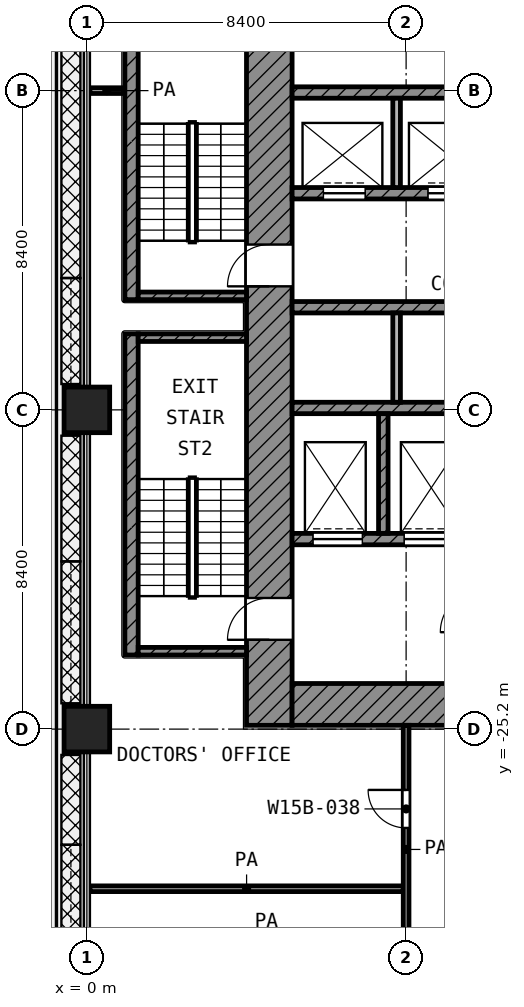
"""IFC4 building model, lengths in metres.
Left out: names, types, materials, properties, quantities, classifications, styles, units other than length and angle.
Written with IfcOpenShell. Run it as: python <this file> out.ifc"""

import sys

from ifc_helpers import new_model, si_unit, direction, frame, frame_2d, origin, origin_2d, place, context, subcontext, project, spatial, rectangle, extrude, element, fill, save


model = new_model("IFC4")
c1 = context("Model", 3, precision=1e-05, world=origin(), true_north=direction((0.0, 1.0)))
c2 = subcontext(c1, "Body", "Model", "MODEL_VIEW")
j1 = project(units=[si_unit("LENGTHUNIT", "METRE"), si_unit("PLANEANGLEUNIT", "RADIAN")], contexts=[c1])
p1 = place(None, origin())
s1 = spatial("IfcSite", under=j1, at=p1, CompositionType="ELEMENT")
p2 = place(p1, origin())
s2 = spatial("IfcBuilding", under=s1, at=p2, CompositionType="ELEMENT")
p3 = place(p2, frame((0.0, 0.0, 85.4)))
s3 = spatial("IfcBuildingStorey", under=s2, at=p3, CompositionType="ELEMENT", Elevation=85.4)
for number, where, z_axis, x_axis in (
    (1, (0.0, -16.8, 0.0), (0.0, 0.0, 1.0), (1.0, 0.0, 0.0)),
    (2, (0.0, -25.2, 0.0), (0.0, 0.0, 1.0), (1.0, 0.0, 0.0)),
):
    element("IfcColumn", number, at=place(p3, frame(where, z_axis=z_axis, x_axis=x_axis)), inside=s3, PredefinedType="COLUMN", context=c2, shape_type="SweptSolid", body=[
        extrude(rectangle(XDim=1.2, YDim=1.2, at=origin_2d()), origin(), (0.0, 0.0, 1.0), 4.2),
    ])
p4 = place(p3, frame((4.8, -25.1, 0.0), z_axis=(0.0, 0.0, 1.0), x_axis=(0.0, 1.0, 0.0)))
e3 = element("IfcWall", 3, at=p4, inside=s3, PredefinedType="SHEAR", context=c2, shape_type="SweptSolid", body=[
    extrude(rectangle(XDim=19.7, YDim=1.2, at=frame_2d((9.85, 0.0))), origin(), (0.0, 0.0, 1.0), 3.9),
])
p5 = place(p4, frame((11.55, 0.0, 0.0)))
e4 = element("IfcOpeningElement", 4, at=p5, cuts=e3, PredefinedType="OPENING", context=c2, shape_type="SweptSolid", body=[
    extrude(rectangle(XDim=1.1, YDim=2.1, at=frame_2d((0.55, 1.05))), frame((0.0, 0.61, 0.0), z_axis=(0.0, -1.0, 0.0), x_axis=(1.0, 0.0, 0.0)), (0.0, 0.0, 1.0), 1.22),
])
p6 = place(p4, frame((2.25, 0.0, 0.0)))
e5 = element("IfcOpeningElement", 5, at=p6, cuts=e3, PredefinedType="OPENING", context=c2, shape_type="SweptSolid", body=[
    extrude(rectangle(XDim=1.1, YDim=2.1, at=frame_2d((0.55, 1.05))), frame((0.0, 0.61, 0.0), z_axis=(0.0, -1.0, 0.0), x_axis=(1.0, 0.0, 0.0)), (0.0, 0.0, 1.0), 1.22),
])
p7 = place(p3, frame((5.4, -24.55, 0.0), z_axis=(0.0, 0.0, 1.0), x_axis=(1.0, 0.0, 0.0)))
e6 = element("IfcWall", 6, at=p7, inside=s3, PredefinedType="SHEAR", context=c2, shape_type="SweptSolid", body=[
    extrude(rectangle(XDim=18.6, YDim=1.1, at=frame_2d((9.3, 0.0))), origin(), (0.0, 0.0, 1.0), 3.9),
])
p8 = place(p7, frame((6.3, 0.0, 0.0)))
e7 = element("IfcOpeningElement", 7, at=p8, cuts=e6, PredefinedType="OPENING", context=c2, shape_type="SweptSolid", body=[
    extrude(rectangle(XDim=1.8, YDim=2.1, at=frame_2d((0.9, 1.05))), frame((0.0, 0.56, 0.0), z_axis=(0.0, -1.0, 0.0), x_axis=(1.0, 0.0, 0.0)), (0.0, 0.0, 1.0), 1.12),
])
p9 = place(p3, frame((5.4, -8.45, 0.0), z_axis=(0.0, 0.0, 1.0), x_axis=(1.0, 0.0, 0.0)))
e8 = element("IfcWall", 8, at=p9, inside=s3, PredefinedType="SHEAR", context=c2, shape_type="SweptSolid", body=[
    extrude(rectangle(XDim=16.65, YDim=0.3, at=frame_2d((8.325, 0.0))), origin(), (0.0, 0.0, 1.0), 3.9),
])
p10 = place(p3, frame((5.4, -11.1, 0.0), z_axis=(0.0, 0.0, 1.0), x_axis=(1.0, 0.0, 0.0)))
e9 = element("IfcWall", 9, at=p10, inside=s3, PredefinedType="SHEAR", context=c2, shape_type="SweptSolid", body=[
    extrude(rectangle(XDim=16.65, YDim=0.3, at=frame_2d((8.325, 0.0))), origin(), (0.0, 0.0, 1.0), 3.9),
])
p11 = place(p10, frame((0.825, 0.0, 0.0)))
e10 = element("IfcOpeningElement", 10, at=p11, cuts=e9, PredefinedType="OPENING", context=c2, shape_type="SweptSolid", body=[
    extrude(rectangle(XDim=1.1, YDim=2.1, at=frame_2d((0.55, 1.05))), frame((0.0, 0.16, 0.0), z_axis=(0.0, -1.0, 0.0), x_axis=(1.0, 0.0, 0.0)), (0.0, 0.0, 1.0), 0.32),
])
p12 = place(p10, frame((3.575, 0.0, 0.0)))
e11 = element("IfcOpeningElement", 11, at=p12, cuts=e9, PredefinedType="OPENING", context=c2, shape_type="SweptSolid", body=[
    extrude(rectangle(XDim=1.1, YDim=2.1, at=frame_2d((0.55, 1.05))), frame((0.0, 0.16, 0.0), z_axis=(0.0, -1.0, 0.0), x_axis=(1.0, 0.0, 0.0)), (0.0, 0.0, 1.0), 0.32),
])
p13 = place(p10, frame((6.325, 0.0, 0.0)))
e12 = element("IfcOpeningElement", 12, at=p13, cuts=e9, PredefinedType="OPENING", context=c2, shape_type="SweptSolid", body=[
    extrude(rectangle(XDim=1.1, YDim=2.1, at=frame_2d((0.55, 1.05))), frame((0.0, 0.16, 0.0), z_axis=(0.0, -1.0, 0.0), x_axis=(1.0, 0.0, 0.0)), (0.0, 0.0, 1.0), 0.32),
])
p14 = place(p10, frame((9.075, 0.0, 0.0)))
e13 = element("IfcOpeningElement", 13, at=p14, cuts=e9, PredefinedType="OPENING", context=c2, shape_type="SweptSolid", body=[
    extrude(rectangle(XDim=1.1, YDim=2.1, at=frame_2d((0.55, 1.05))), frame((0.0, 0.16, 0.0), z_axis=(0.0, -1.0, 0.0), x_axis=(1.0, 0.0, 0.0)), (0.0, 0.0, 1.0), 0.32),
])
for number, where, z_axis, x_axis in (
    (14, (5.4, -14.1, 0.0), (0.0, 0.0, 1.0), (1.0, 0.0, 0.0)),
    (15, (5.4, -16.75, 0.0), (0.0, 0.0, 1.0), (1.0, 0.0, 0.0)),
):
    element("IfcWall", number, at=place(p3, frame(where, z_axis=z_axis, x_axis=x_axis)), inside=s3, PredefinedType="SHEAR", context=c2, shape_type="SweptSolid", body=[
        extrude(rectangle(XDim=16.65, YDim=0.3, at=frame_2d((8.325, 0.0))), origin(), (0.0, 0.0, 1.0), 3.9),
    ])
p15 = place(p3, frame((5.4, -20.2, 0.0), z_axis=(0.0, 0.0, 1.0), x_axis=(1.0, 0.0, 0.0)))
e16 = element("IfcWall", 16, at=p15, inside=s3, PredefinedType="SHEAR", context=c2, shape_type="SweptSolid", body=[
    extrude(rectangle(XDim=14.65, YDim=0.3, at=frame_2d((7.325, 0.0))), origin(), (0.0, 0.0, 1.0), 3.9),
])
p16 = place(p15, frame((10.55, 0.0, 0.0)))
e17 = element("IfcOpeningElement", 17, at=p16, cuts=e16, PredefinedType="OPENING", context=c2, shape_type="SweptSolid", body=[
    extrude(rectangle(XDim=1.3, YDim=2.1, at=frame_2d((0.65, 1.05))), frame((0.0, 0.16, 0.0), z_axis=(0.0, -1.0, 0.0), x_axis=(1.0, 0.0, 0.0)), (0.0, 0.0, 1.0), 0.32),
])
p17 = place(p15, frame((12.95, 0.0, 0.0)))
e18 = element("IfcOpeningElement", 18, at=p17, cuts=e16, PredefinedType="OPENING", context=c2, shape_type="SweptSolid", body=[
    extrude(rectangle(XDim=1.3, YDim=2.1, at=frame_2d((0.65, 1.05))), frame((0.0, 0.16, 0.0), z_axis=(0.0, -1.0, 0.0), x_axis=(1.0, 0.0, 0.0)), (0.0, 0.0, 1.0), 0.32),
])
p18 = place(p15, frame((0.55, 0.0, 0.0)))
e19 = element("IfcOpeningElement", 19, at=p18, cuts=e16, PredefinedType="OPENING", context=c2, shape_type="SweptSolid", body=[
    extrude(rectangle(XDim=1.3, YDim=2.1, at=frame_2d((0.65, 1.05))), frame((0.0, 0.16, 0.0), z_axis=(0.0, -1.0, 0.0), x_axis=(1.0, 0.0, 0.0)), (0.0, 0.0, 1.0), 0.32),
])
p19 = place(p15, frame((2.95, 0.0, 0.0)))
e20 = element("IfcOpeningElement", 20, at=p19, cuts=e16, PredefinedType="OPENING", context=c2, shape_type="SweptSolid", body=[
    extrude(rectangle(XDim=1.3, YDim=2.1, at=frame_2d((0.65, 1.05))), frame((0.0, 0.16, 0.0), z_axis=(0.0, -1.0, 0.0), x_axis=(1.0, 0.0, 0.0)), (0.0, 0.0, 1.0), 0.32),
])
p20 = place(p15, frame((5.35, 0.0, 0.0)))
e21 = element("IfcOpeningElement", 21, at=p20, cuts=e16, PredefinedType="OPENING", context=c2, shape_type="SweptSolid", body=[
    extrude(rectangle(XDim=0.9, YDim=2.1, at=frame_2d((0.45, 1.05))), frame((0.0, 0.16, 0.0), z_axis=(0.0, -1.0, 0.0), x_axis=(1.0, 0.0, 0.0)), (0.0, 0.0, 1.0), 0.32),
])
p21 = place(p15, frame((7.75, 0.0, 0.0)))
e22 = element("IfcOpeningElement", 22, at=p21, cuts=e16, PredefinedType="OPENING", context=c2, shape_type="SweptSolid", body=[
    extrude(rectangle(XDim=0.9, YDim=2.1, at=frame_2d((0.45, 1.05))), frame((0.0, 0.16, 0.0), z_axis=(0.0, -1.0, 0.0), x_axis=(1.0, 0.0, 0.0)), (0.0, 0.0, 1.0), 0.32),
])
p22 = place(p3, frame((7.8, -20.05, 0.0), z_axis=(0.0, 0.0, 1.0), x_axis=(0.0, 1.0, 0.0)))
e23 = element("IfcWall", 23, at=p22, inside=s3, PredefinedType="SHEAR", context=c2, shape_type="SweptSolid", body=[
    extrude(rectangle(XDim=3.15, YDim=0.25, at=frame_2d((1.575, 0.0))), origin(), (0.0, 0.0, 1.0), 3.9),
])
p23 = place(p3, frame((8.15, -10.95, 0.0), z_axis=(0.0, 0.0, 1.0), x_axis=(0.0, 1.0, 0.0)))
e24 = element("IfcWall", 24, at=p23, inside=s3, PredefinedType="PARTITIONING", context=c2, shape_type="SweptSolid", body=[
    extrude(rectangle(XDim=2.35, YDim=0.2, at=frame_2d((1.175, 0.0))), origin(), (0.0, 0.0, 1.0), 3.9),
])
p24 = place(p3, frame((8.15, -16.6, 0.0), z_axis=(0.0, 0.0, 1.0), x_axis=(0.0, 1.0, 0.0)))
e25 = element("IfcWall", 25, at=p24, inside=s3, PredefinedType="PARTITIONING", context=c2, shape_type="SweptSolid", body=[
    extrude(rectangle(XDim=2.35, YDim=0.2, at=frame_2d((1.175, 0.0))), origin(), (0.0, 0.0, 1.0), 3.9),
])
p25 = place(p3, frame((1.175, -13.9, 0.0), z_axis=(0.0, 0.0, 1.0), x_axis=(0.0, 1.0, 0.0)))
e26 = element("IfcWall", 26, at=p25, inside=s3, PredefinedType="SHEAR", context=c2, shape_type="SweptSolid", body=[
    extrude(rectangle(XDim=8.45, YDim=0.35, at=frame_2d((4.225, 0.0))), origin(), (0.0, 0.0, 1.0), 3.9),
])
p26 = place(p3, frame((1.35, -13.8, 0.0), z_axis=(0.0, 0.0, 1.0), x_axis=(1.0, 0.0, 0.0)))
e27 = element("IfcWall", 27, at=p26, inside=s3, PredefinedType="SHEAR", context=c2, shape_type="SweptSolid", body=[
    extrude(rectangle(XDim=2.85, YDim=0.2, at=frame_2d((1.425, 0.0))), origin(), (0.0, 0.0, 1.0), 3.9),
])
p27 = place(p3, frame((1.175, -23.25, 0.0), z_axis=(0.0, 0.0, 1.0), x_axis=(0.0, 1.0, 0.0)))
e28 = element("IfcWall", 28, at=p27, inside=s3, PredefinedType="SHEAR", context=c2, shape_type="SweptSolid", body=[
    extrude(rectangle(XDim=8.45, YDim=0.35, at=frame_2d((4.225, 0.0))), origin(), (0.0, 0.0, 1.0), 3.9),
])
for number, where, z_axis, x_axis in (
    (29, (1.35, -14.9, 0.0), (0.0, 0.0, 1.0), (1.0, 0.0, 0.0)),
    (30, (1.35, -23.15, 0.0), (0.0, 0.0, 1.0), (1.0, 0.0, 0.0)),
):
    element("IfcWall", number, at=place(p3, frame(where, z_axis=z_axis, x_axis=x_axis)), inside=s3, PredefinedType="SHEAR", context=c2, shape_type="SweptSolid", body=[
        extrude(rectangle(XDim=2.85, YDim=0.2, at=frame_2d((1.425, 0.0))), origin(), (0.0, 0.0, 1.0), 3.9),
    ])
p28 = place(p3, frame((0.08, -29.4, 0.0), z_axis=(0.0, 0.0, 1.0), x_axis=(1.0, 0.0, 0.0)))
e31 = element("IfcWall", 31, at=p28, inside=s3, PredefinedType="PARTITIONING", context=c2, shape_type="SweptSolid", body=[
    extrude(rectangle(XDim=8.245, YDim=0.15, at=frame_2d((4.123, 0.0))), origin(), (0.0, 0.0, 1.0), 3.9),
])
p29 = place(p3, frame((0.08, -8.4, 0.0), z_axis=(0.0, 0.0, 1.0), x_axis=(1.0, 0.0, 0.0)))
e32 = element("IfcWall", 32, at=p29, inside=s3, PredefinedType="PARTITIONING", context=c2, shape_type="SweptSolid", body=[
    extrude(rectangle(XDim=0.89, YDim=0.15, at=frame_2d((0.445, 0.0))), origin(), (0.0, 0.0, 1.0), 3.9),
])
p30 = place(p3, frame((8.4, -31.632, 0.0), z_axis=(0.0, 0.0, 1.0), x_axis=(0.0, 1.0, 0.0)))
e33 = element("IfcWall", 33, at=p30, inside=s3, PredefinedType="PARTITIONING", context=c2, shape_type="SweptSolid", body=[
    extrude(rectangle(XDim=6.532, YDim=0.15, at=frame_2d((3.266, 0.0))), origin(), (0.0, 0.0, 1.0), 3.9),
])
p31 = place(p30, frame((3.832, 0.0, 0.0)))
e34 = element("IfcOpeningElement", 34, at=p31, cuts=e33, PredefinedType="OPENING", context=c2, shape_type="SweptSolid", body=[
    extrude(rectangle(XDim=1.0, YDim=2.1, at=frame_2d((0.5, 1.05))), frame((0.0, 0.085, 0.0), z_axis=(0.0, -1.0, 0.0), x_axis=(1.0, 0.0, 0.0)), (0.0, 0.0, 1.0), 0.17),
])
p32 = place(p11, origin())
e35 = element("IfcDoor", 35, at=p32, inside=s3, OperationType="DOUBLE_DOOR_SLIDING", PredefinedType="DOOR", context=c2, shape_type="SweptSolid", body=[
    extrude(rectangle(XDim=1.1, YDim=2.1, at=frame_2d((0.55, 1.05))), frame((0.0, 0.025, 0.0), z_axis=(0.0, -1.0, 0.0), x_axis=(1.0, 0.0, 0.0)), (0.0, 0.0, 1.0), 0.05),
])
fill(e10, e35)
p33 = place(p12, origin())
e36 = element("IfcDoor", 36, at=p33, inside=s3, OperationType="DOUBLE_DOOR_SLIDING", PredefinedType="DOOR", context=c2, shape_type="SweptSolid", body=[
    extrude(rectangle(XDim=1.1, YDim=2.1, at=frame_2d((0.55, 1.05))), frame((0.0, 0.025, 0.0), z_axis=(0.0, -1.0, 0.0), x_axis=(1.0, 0.0, 0.0)), (0.0, 0.0, 1.0), 0.05),
])
fill(e11, e36)
p34 = place(p18, origin())
e37 = element("IfcDoor", 37, at=p34, inside=s3, OperationType="DOUBLE_DOOR_SLIDING", PredefinedType="DOOR", context=c2, shape_type="SweptSolid", body=[
    extrude(rectangle(XDim=1.3, YDim=2.1, at=frame_2d((0.65, 1.05))), frame((0.0, 0.025, 0.0), z_axis=(0.0, -1.0, 0.0), x_axis=(1.0, 0.0, 0.0)), (0.0, 0.0, 1.0), 0.05),
])
fill(e19, e37)
p35 = place(p19, origin())
e38 = element("IfcDoor", 38, at=p35, inside=s3, OperationType="DOUBLE_DOOR_SLIDING", PredefinedType="DOOR", context=c2, shape_type="SweptSolid", body=[
    extrude(rectangle(XDim=1.3, YDim=2.1, at=frame_2d((0.65, 1.05))), frame((0.0, 0.025, 0.0), z_axis=(0.0, -1.0, 0.0), x_axis=(1.0, 0.0, 0.0)), (0.0, 0.0, 1.0), 0.05),
])
fill(e20, e38)
p36 = place(p5, origin())
e39 = element("IfcDoor", 39, at=p36, inside=s3, OperationType="SINGLE_SWING_LEFT", PredefinedType="DOOR", context=c2, shape_type="SweptSolid", body=[
    extrude(rectangle(XDim=1.1, YDim=2.1, at=frame_2d((0.55, 1.05))), frame((0.0, 0.025, 0.0), z_axis=(0.0, -1.0, 0.0), x_axis=(1.0, 0.0, 0.0)), (0.0, 0.0, 1.0), 0.05),
])
fill(e4, e39)
p37 = place(p6, origin())
e40 = element("IfcDoor", 40, at=p37, inside=s3, OperationType="SINGLE_SWING_LEFT", PredefinedType="DOOR", context=c2, shape_type="SweptSolid", body=[
    extrude(rectangle(XDim=1.1, YDim=2.1, at=frame_2d((0.55, 1.05))), frame((0.0, 0.025, 0.0), z_axis=(0.0, -1.0, 0.0), x_axis=(1.0, 0.0, 0.0)), (0.0, 0.0, 1.0), 0.05),
])
fill(e5, e40)
p38 = place(p31, origin())
e41 = element("IfcDoor", 41, at=p38, inside=s3, OperationType="SINGLE_SWING_RIGHT", PredefinedType="DOOR", context=c2, shape_type="SweptSolid", body=[
    extrude(rectangle(XDim=1.0, YDim=2.1, at=frame_2d((0.5, 1.05))), frame((0.0, 0.025, 0.0), z_axis=(0.0, -1.0, 0.0), x_axis=(1.0, 0.0, 0.0)), (0.0, 0.0, 1.0), 0.05),
])
fill(e34, e41)
save(model, sys.argv[1])
